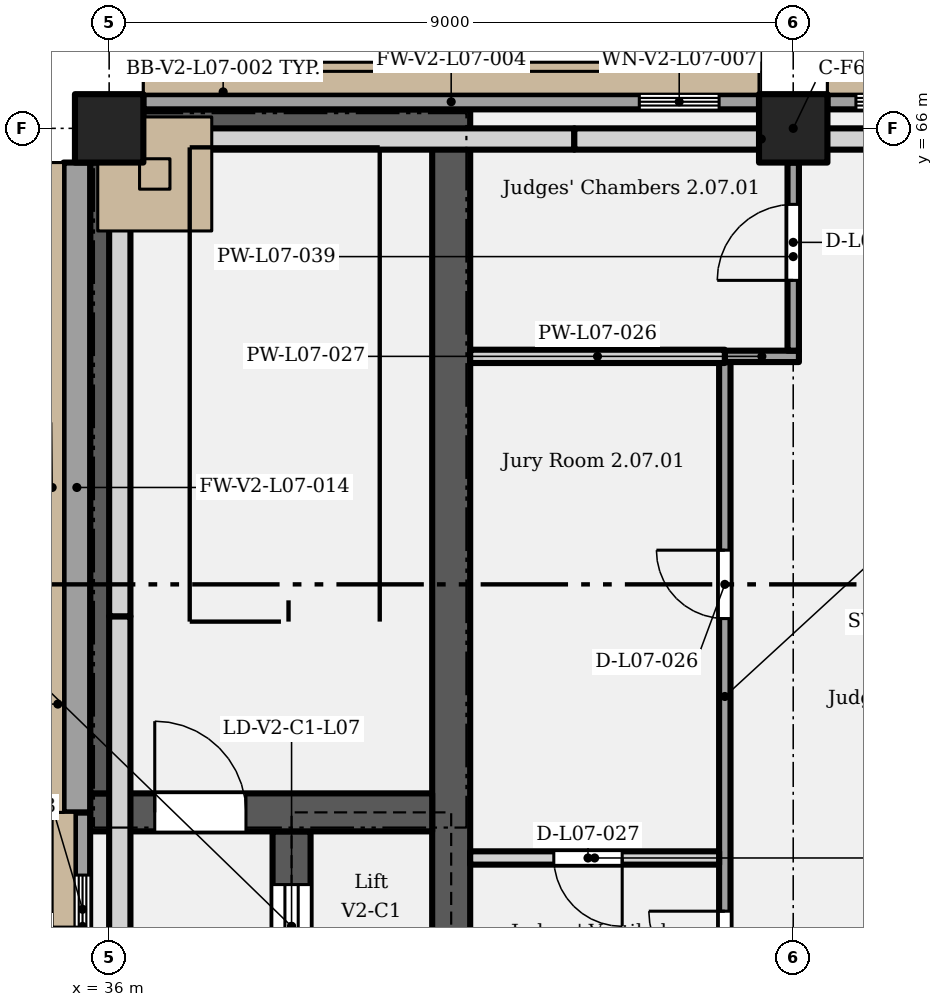
"""IFC4 building model, lengths in metres.
Left out: names, types, materials, properties, quantities, classifications, styles, units other than length and angle.
Written with IfcOpenShell. Run it as: python <this file> out.ifc"""

import sys

from ifc_helpers import new_model, si_unit, direction, frame, frame_2d, origin, origin_2d, place, context, subcontext, project, spatial, rectangle, extrude, element, fill, save


model = new_model("IFC4")
c1 = context("Model", 3, precision=1e-05, world=origin(), true_north=direction((0.0, 1.0)))
c2 = subcontext(c1, "Body", "Model", "MODEL_VIEW")
j1 = project(units=[si_unit("LENGTHUNIT", "METRE"), si_unit("PLANEANGLEUNIT", "RADIAN")], contexts=[c1])
p1 = place(None, origin())
s1 = spatial("IfcSite", under=j1, at=p1, CompositionType="ELEMENT")
p2 = place(p1, origin())
s2 = spatial("IfcBuilding", under=s1, at=p2, CompositionType="ELEMENT")
p3 = place(p2, frame((0.0, 0.0, 39.0)))
s3 = spatial("IfcBuildingStorey", under=s2, at=p3, CompositionType="ELEMENT", Elevation=39.0)
for number, where, z_axis, x_axis in (
    (1, (36.0, 66.0, 0.0), (0.0, 0.0, 1.0), (1.0, 0.0, 0.0)),
    (2, (45.0, 66.0, 0.0), (0.0, 0.0, 1.0), (1.0, 0.0, 0.0)),
):
    element("IfcColumn", number, at=place(p3, frame(where, z_axis=z_axis, x_axis=x_axis)), inside=s3, PredefinedType="COLUMN", context=c2, shape_type="SweptSolid", body=[
        extrude(rectangle(XDim=0.9, YDim=0.9, at=origin_2d()), origin(), (0.0, 0.0, 1.0), 5.4),
    ])
p4 = place(p3, frame((38.4, 54.25, 0.0), z_axis=(0.0, 0.0, 1.0), x_axis=(0.0, 1.0, 0.0)))
e3 = element("IfcWall", 3, at=p4, inside=s3, PredefinedType="SHEAR", context=c2, shape_type="SweptSolid", body=[
    extrude(rectangle(XDim=2.5, YDim=0.5, at=frame_2d((1.25, 0.0))), origin(), (0.0, 0.0, 1.0), 5.15),
])
p5 = place(p4, frame((0.7, 0.0, 0.0)))
e4 = element("IfcOpeningElement", 4, at=p5, cuts=e3, PredefinedType="OPENING", context=c2, shape_type="SweptSolid", body=[
    extrude(rectangle(XDim=1.1, YDim=2.1, at=frame_2d((0.55, 1.05))), frame((0.0, 0.26, 0.0), z_axis=(0.0, -1.0, 0.0), x_axis=(1.0, 0.0, 0.0)), (0.0, 0.0, 1.0), 0.52),
])
p6 = place(p3, frame((40.5, 54.25, 0.0), z_axis=(0.0, 0.0, 1.0), x_axis=(0.0, 1.0, 0.0)))
e5 = element("IfcWall", 5, at=p6, inside=s3, PredefinedType="SHEAR", context=c2, shape_type="SweptSolid", body=[
    extrude(rectangle(XDim=11.5, YDim=0.5, at=frame_2d((5.75, 0.0))), origin(), (0.0, 0.0, 1.0), 5.15),
])
p7 = place(p3, frame((35.75, 57.0, 0.0), z_axis=(0.0, 0.0, 1.0), x_axis=(1.0, 0.0, 0.0)))
e6 = element("IfcWall", 6, at=p7, inside=s3, PredefinedType="SHEAR", context=c2, shape_type="SweptSolid", body=[
    extrude(rectangle(XDim=4.5, YDim=0.5, at=frame_2d((2.25, 0.0))), origin(), (0.0, 0.0, 1.0), 5.15),
])
p8 = place(p7, frame((0.85, 0.0, 0.0)))
e7 = element("IfcOpeningElement", 7, at=p8, cuts=e6, PredefinedType="OPENING", context=c2, shape_type="SweptSolid", body=[
    extrude(rectangle(XDim=1.2, YDim=2.1, at=frame_2d((0.6, 1.05))), frame((0.0, 0.26, 0.0), z_axis=(0.0, -1.0, 0.0), x_axis=(1.0, 0.0, 0.0)), (0.0, 0.0, 1.0), 0.52),
])
p9 = place(p3, frame((36.0, 57.25, 0.0), z_axis=(0.0, 0.0, 1.0), x_axis=(0.0, 1.0, 0.0)))
e8 = element("IfcWall", 8, at=p9, inside=s3, PredefinedType="SHEAR", context=c2, shape_type="SweptSolid", body=[
    extrude(rectangle(XDim=8.3, YDim=0.5, at=frame_2d((4.15, 0.0))), origin(), (0.0, 0.0, 1.0), 5.15),
])
p10 = place(p3, frame((36.45, 66.0, 0.0), z_axis=(0.0, 0.0, 1.0), x_axis=(1.0, 0.0, 0.0)))
e9 = element("IfcWall", 9, at=p10, inside=s3, PredefinedType="SHEAR", context=c2, shape_type="SweptSolid", body=[
    extrude(rectangle(XDim=4.3, YDim=0.5, at=frame_2d((2.15, 0.0))), origin(), (0.0, 0.0, 1.0), 5.15),
])
p11 = place(p3, frame((36.45, 66.35, 0.0), z_axis=(0.0, 0.0, 1.0), x_axis=(1.0, 0.0, 0.0)))
e10 = element("IfcWall", 10, at=p11, inside=s3, PredefinedType="SOLIDWALL", context=c2, shape_type="SweptSolid", body=[
    extrude(rectangle(XDim=8.1, YDim=0.2, at=frame_2d((4.05, 0.0))), origin(), (0.0, 0.0, 1.0), 5.15),
])
p12 = place(p11, frame((6.525, 0.0, 1.05)))
e11 = element("IfcOpeningElement", 11, at=p12, cuts=e10, PredefinedType="OPENING", context=c2, shape_type="SweptSolid", body=[
    extrude(rectangle(XDim=1.05, YDim=2.4, at=frame_2d((0.525, 1.2))), frame((0.0, 0.11, 0.0), z_axis=(0.0, -1.0, 0.0), x_axis=(1.0, 0.0, 0.0)), (0.0, 0.0, 1.0), 0.22),
])
p13 = place(p3, frame((45.45, 66.35, 0.0), z_axis=(0.0, 0.0, 1.0), x_axis=(1.0, 0.0, 0.0)))
e12 = element("IfcWall", 12, at=p13, inside=s3, PredefinedType="SOLIDWALL", context=c2, shape_type="SweptSolid", body=[
    extrude(rectangle(XDim=8.1, YDim=0.2, at=frame_2d((4.05, 0.0))), origin(), (0.0, 0.0, 1.0), 5.15),
])
p14 = place(p13, frame((0.375, 0.0, 1.2)))
e13 = element("IfcOpeningElement", 13, at=p14, cuts=e12, PredefinedType="OPENING", context=c2, shape_type="SweptSolid", body=[
    extrude(rectangle(XDim=1.35, YDim=3.0, at=frame_2d((0.675, 1.5))), frame((0.0, 0.11, 0.0), z_axis=(0.0, -1.0, 0.0), x_axis=(1.0, 0.0, 0.0)), (0.0, 0.0, 1.0), 0.22),
])
p15 = place(p3, frame((35.65, 54.45, 0.0), z_axis=(0.0, 0.0, 1.0), x_axis=(0.0, 1.0, 0.0)))
e14 = element("IfcWall", 14, at=p15, inside=s3, PredefinedType="SOLIDWALL", context=c2, shape_type="SweptSolid", body=[
    extrude(rectangle(XDim=2.55, YDim=0.2, at=frame_2d((1.275, 0.0))), origin(), (0.0, 0.0, 1.0), 5.15),
])
p16 = place(p15, frame((0.375, 0.0, 1.2)))
e15 = element("IfcOpeningElement", 15, at=p16, cuts=e14, PredefinedType="OPENING", context=c2, shape_type="SweptSolid", body=[
    extrude(rectangle(XDim=1.35, YDim=3.0, at=frame_2d((0.675, 1.5))), frame((0.0, 0.11, 0.0), z_axis=(0.0, -1.0, 0.0), x_axis=(1.0, 0.0, 0.0)), (0.0, 0.0, 1.0), 0.22),
])
p17 = place(p3, frame((35.575, 57.0, 0.0), z_axis=(0.0, 0.0, 1.0), x_axis=(0.0, 1.0, 0.0)))
e16 = element("IfcWall", 16, at=p17, inside=s3, PredefinedType="SOLIDWALL", context=c2, shape_type="SweptSolid", body=[
    extrude(rectangle(XDim=8.55, YDim=0.35, at=frame_2d((4.275, 0.0))), origin(), (0.0, 0.0, 1.0), 5.15),
])
p18 = place(p3, frame((36.0, 65.4, 5.4), z_axis=(0.0, 0.0, 1.0), x_axis=(1.0, 0.0, 0.0)))
e17 = element("IfcWall", 17, at=p18, inside=s3, PredefinedType="SOLIDWALL", context=c2, shape_type="SweptSolid", body=[
    extrude(rectangle(XDim=1.2, YDim=1.2, at=frame_2d((0.6, 0.0))), origin(), (0.0, 0.0, 1.0), 3.0),
])
p19 = place(p3, frame((37.2, 65.86, 5.4), z_axis=(0.0, 0.0, 1.0), x_axis=(1.0, 0.0, 0.0)))
e18 = element("IfcWall", 18, at=p19, inside=s3, PredefinedType="PARAPET", context=c2, shape_type="SweptSolid", body=[
    extrude(rectangle(XDim=4.92, YDim=0.28, at=frame_2d((2.46, 0.0))), origin(), (0.0, 0.0, 1.0), 1.2),
])
p20 = place(p3, frame((42.12, 65.86, 5.4), z_axis=(0.0, 0.0, 1.0), x_axis=(1.0, 0.0, 0.0)))
e19 = element("IfcWall", 19, at=p20, inside=s3, PredefinedType="PARAPET", context=c2, shape_type="SweptSolid", body=[
    extrude(rectangle(XDim=4.92, YDim=0.28, at=frame_2d((2.46, 0.0))), origin(), (0.0, 0.0, 1.0), 1.4),
])
p21 = place(p3, frame((36.14, 54.36, 5.4), z_axis=(0.0, 0.0, 1.0), x_axis=(0.0, 1.0, 0.0)))
e20 = element("IfcWall", 20, at=p21, inside=s3, PredefinedType="PARAPET", context=c2, shape_type="SweptSolid", body=[
    extrude(rectangle(XDim=5.22, YDim=0.28, at=frame_2d((2.61, 0.0))), origin(), (0.0, 0.0, 1.0), 1.4),
])
p22 = place(p3, frame((36.14, 59.58, 5.4), z_axis=(0.0, 0.0, 1.0), x_axis=(0.0, 1.0, 0.0)))
e21 = element("IfcWall", 21, at=p22, inside=s3, PredefinedType="PARAPET", context=c2, shape_type="SweptSolid", body=[
    extrude(rectangle(XDim=5.22, YDim=0.28, at=frame_2d((2.61, 0.0))), origin(), (0.0, 0.0, 1.0), 1.2),
])
p23 = place(p3, frame((40.75, 56.4, 0.0), z_axis=(0.0, 0.0, 1.0), x_axis=(1.0, 0.0, 0.0)))
e22 = element("IfcWall", 22, at=p23, inside=s3, PredefinedType="PARTITIONING", context=c2, shape_type="SweptSolid", body=[
    extrude(rectangle(XDim=3.275, YDim=0.175, at=frame_2d((1.637, 0.0))), origin(), (0.0, 0.0, 1.0), 5.15),
])
p24 = place(p23, frame((2.0, 0.0, 0.0), z_axis=(0.0, 0.0, 1.0), x_axis=(-1.0, 0.0, 0.0)))
e23 = element("IfcOpeningElement", 23, at=p24, cuts=e22, PredefinedType="OPENING", context=c2, shape_type="SweptSolid", body=[
    extrude(rectangle(XDim=0.9, YDim=2.1, at=frame_2d((0.45, 1.05))), frame((0.0, 0.097, 0.0), z_axis=(0.0, -1.0, 0.0), x_axis=(1.0, 0.0, 0.0)), (0.0, 0.0, 1.0), 0.195),
])
p25 = place(p3, frame((40.75, 63.0, 0.0), z_axis=(0.0, 0.0, 1.0), x_axis=(1.0, 0.0, 0.0)))
e24 = element("IfcWall", 24, at=p25, inside=s3, PredefinedType="PARTITIONING", context=c2, shape_type="SweptSolid", body=[
    extrude(rectangle(XDim=3.35, YDim=0.175, at=frame_2d((1.675, 0.0))), origin(), (0.0, 0.0, 1.0), 5.15),
])
p26 = place(p3, frame((44.1, 63.0, 0.0), z_axis=(0.0, 0.0, 1.0), x_axis=(1.0, 0.0, 0.0)))
e25 = element("IfcWall", 25, at=p26, inside=s3, PredefinedType="PARTITIONING", context=c2, shape_type="SweptSolid", body=[
    extrude(rectangle(XDim=0.975, YDim=0.15, at=frame_2d((0.487, 0.0))), origin(), (0.0, 0.0, 1.0), 5.15),
])
p27 = place(p3, frame((44.1, 54.125, 0.0), z_axis=(0.0, 0.0, 1.0), x_axis=(0.0, 1.0, 0.0)))
e26 = element("IfcWall", 26, at=p27, inside=s3, PredefinedType="PARTITIONING", context=c2, shape_type="SweptSolid", body=[
    extrude(rectangle(XDim=8.8, YDim=0.15, at=frame_2d((4.4, 0.0))), origin(), (0.0, 0.0, 1.0), 5.15),
])
p28 = place(p27, frame((0.575, 0.0, 0.0)))
e27 = element("IfcOpeningElement", 27, at=p28, cuts=e26, PredefinedType="OPENING", context=c2, shape_type="SweptSolid", body=[
    extrude(rectangle(XDim=1.0, YDim=2.1, at=frame_2d((0.5, 1.05))), frame((0.0, 0.085, 0.0), z_axis=(0.0, -1.0, 0.0), x_axis=(1.0, 0.0, 0.0)), (0.0, 0.0, 1.0), 0.17),
])
p29 = place(p27, frame((5.425, 0.0, 0.0)))
e28 = element("IfcOpeningElement", 28, at=p29, cuts=e26, PredefinedType="OPENING", context=c2, shape_type="SweptSolid", body=[
    extrude(rectangle(XDim=0.9, YDim=2.1, at=frame_2d((0.45, 1.05))), frame((0.0, 0.085, 0.0), z_axis=(0.0, -1.0, 0.0), x_axis=(1.0, 0.0, 0.0)), (0.0, 0.0, 1.0), 0.17),
])
p30 = place(p3, frame((45.0, 63.075, 0.0), z_axis=(0.0, 0.0, 1.0), x_axis=(0.0, 1.0, 0.0)))
e29 = element("IfcWall", 29, at=p30, inside=s3, PredefinedType="PARTITIONING", context=c2, shape_type="SweptSolid", body=[
    extrude(rectangle(XDim=2.475, YDim=0.15, at=frame_2d((1.238, 0.0))), origin(), (0.0, 0.0, 1.0), 4.4),
])
p31 = place(p30, frame((0.925, 0.0, 0.0)))
e30 = element("IfcOpeningElement", 30, at=p31, cuts=e29, PredefinedType="OPENING", context=c2, shape_type="SweptSolid", body=[
    extrude(rectangle(XDim=1.0, YDim=2.1, at=frame_2d((0.5, 1.05))), frame((0.0, 0.085, 0.0), z_axis=(0.0, -1.0, 0.0), x_axis=(1.0, 0.0, 0.0)), (0.0, 0.0, 1.0), 0.17),
])
p32 = place(p12, origin())
e31 = element("IfcWindow", 31, at=p32, inside=s3, PartitioningType="SINGLE_PANEL", PredefinedType="WINDOW", context=c2, shape_type="SweptSolid", body=[
    extrude(rectangle(XDim=1.05, YDim=2.4, at=frame_2d((0.525, 1.2))), frame((0.0, 0.03, 0.0), z_axis=(0.0, -1.0, 0.0), x_axis=(1.0, 0.0, 0.0)), (0.0, 0.0, 1.0), 0.06),
])
fill(e11, e31)
p33 = place(p14, origin())
e32 = element("IfcWindow", 32, at=p33, inside=s3, PartitioningType="SINGLE_PANEL", PredefinedType="WINDOW", context=c2, shape_type="SweptSolid", body=[
    extrude(rectangle(XDim=1.35, YDim=3.0, at=frame_2d((0.675, 1.5))), frame((0.0, 0.03, 0.0), z_axis=(0.0, -1.0, 0.0), x_axis=(1.0, 0.0, 0.0)), (0.0, 0.0, 1.0), 0.06),
])
fill(e13, e32)
p34 = place(p16, origin())
e33 = element("IfcWindow", 33, at=p34, inside=s3, PartitioningType="SINGLE_PANEL", PredefinedType="WINDOW", context=c2, shape_type="SweptSolid", body=[
    extrude(rectangle(XDim=1.35, YDim=3.0, at=frame_2d((0.675, 1.5))), frame((0.0, 0.03, 0.0), z_axis=(0.0, -1.0, 0.0), x_axis=(1.0, 0.0, 0.0)), (0.0, 0.0, 1.0), 0.06),
])
fill(e15, e33)
p35 = place(p5, origin())
e34 = element("IfcDoor", 34, at=p35, inside=s3, OperationType="SLIDING_TO_LEFT", PredefinedType="DOOR", context=c2, shape_type="SweptSolid", body=[
    extrude(rectangle(XDim=1.1, YDim=2.1, at=frame_2d((0.55, 1.05))), frame((0.0, 0.025, 0.0), z_axis=(0.0, -1.0, 0.0), x_axis=(1.0, 0.0, 0.0)), (0.0, 0.0, 1.0), 0.05),
])
fill(e4, e34)
p36 = place(p8, origin())
e35 = element("IfcDoor", 35, at=p36, inside=s3, OperationType="SINGLE_SWING_LEFT", PredefinedType="DOOR", context=c2, shape_type="SweptSolid", body=[
    extrude(rectangle(XDim=1.2, YDim=2.1, at=frame_2d((0.6, 1.05))), frame((0.0, 0.025, 0.0), z_axis=(0.0, -1.0, 0.0), x_axis=(1.0, 0.0, 0.0)), (0.0, 0.0, 1.0), 0.05),
])
fill(e7, e35)
p37 = place(p28, origin())
e36 = element("IfcDoor", 36, at=p37, inside=s3, OperationType="SINGLE_SWING_RIGHT", PredefinedType="DOOR", context=c2, shape_type="SweptSolid", body=[
    extrude(rectangle(XDim=1.0, YDim=2.1, at=frame_2d((0.5, 1.05))), frame((0.0, 0.025, 0.0), z_axis=(0.0, -1.0, 0.0), x_axis=(1.0, 0.0, 0.0)), (0.0, 0.0, 1.0), 0.05),
])
fill(e27, e36)
p38 = place(p29, origin())
e37 = element("IfcDoor", 37, at=p38, inside=s3, OperationType="SINGLE_SWING_RIGHT", PredefinedType="DOOR", context=c2, shape_type="SweptSolid", body=[
    extrude(rectangle(XDim=0.9, YDim=2.1, at=frame_2d((0.45, 1.05))), frame((0.0, 0.025, 0.0), z_axis=(0.0, -1.0, 0.0), x_axis=(1.0, 0.0, 0.0)), (0.0, 0.0, 1.0), 0.05),
])
fill(e28, e37)
p39 = place(p24, origin())
e38 = element("IfcDoor", 38, at=p39, inside=s3, OperationType="SINGLE_SWING_LEFT", PredefinedType="DOOR", context=c2, shape_type="SweptSolid", body=[
    extrude(rectangle(XDim=0.9, YDim=2.1, at=frame_2d((0.45, 1.05))), frame((0.0, 0.025, 0.0), z_axis=(0.0, -1.0, 0.0), x_axis=(1.0, 0.0, 0.0)), (0.0, 0.0, 1.0), 0.05),
])
fill(e23, e38)
p40 = place(p31, origin())
e39 = element("IfcDoor", 39, at=p40, inside=s3, OperationType="SINGLE_SWING_LEFT", PredefinedType="DOOR", context=c2, shape_type="SweptSolid", body=[
    extrude(rectangle(XDim=1.0, YDim=2.1, at=frame_2d((0.5, 1.05))), frame((0.0, 0.025, 0.0), z_axis=(0.0, -1.0, 0.0), x_axis=(1.0, 0.0, 0.0)), (0.0, 0.0, 1.0), 0.05),
])
fill(e30, e39)
save(model, sys.argv[1])
